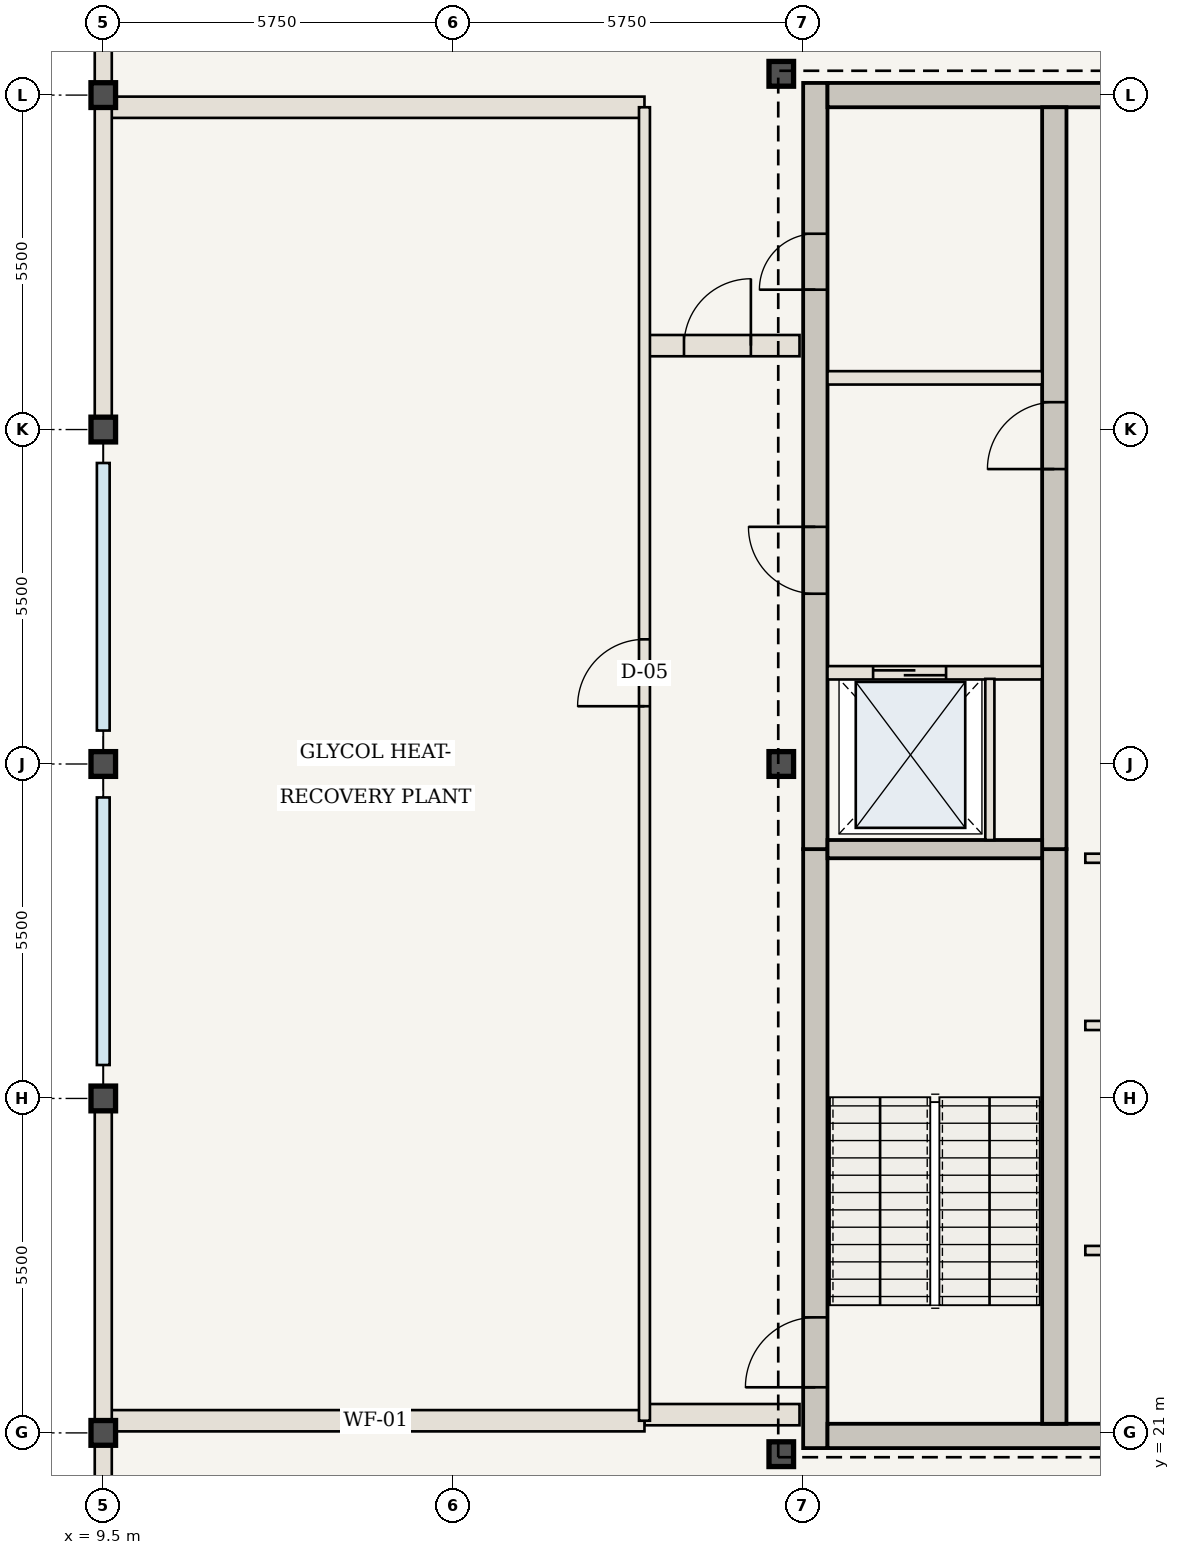
"""IFC4 building model, lengths in metres.
Left out: names, types, materials, properties, quantities, classifications, styles, units other than length and angle.
Written with IfcOpenShell. Run it as: python <this file> out.ifc"""

import sys

from ifc_helpers import new_model, si_unit, direction, frame, frame_2d, origin, origin_2d, place, context, subcontext, project, spatial, rectangle, i_section, extrude, element, fill, save


model = new_model("IFC4")
c1 = context("Model", 3, precision=1e-05, world=origin(), true_north=direction((0.0, 1.0)))
c2 = subcontext(c1, "Body", "Model", "MODEL_VIEW")
j1 = project(units=[si_unit("LENGTHUNIT", "METRE"), si_unit("PLANEANGLEUNIT", "RADIAN")], contexts=[c1])
p1 = place(None, origin())
s1 = spatial("IfcSite", under=j1, at=p1, CompositionType="ELEMENT")
p2 = place(p1, origin())
s2 = spatial("IfcBuilding", under=s1, at=p2, CompositionType="ELEMENT")
p3 = place(p2, frame((0.0, 0.0, 322.35)))
s3 = spatial("IfcBuildingStorey", under=s2, at=p3, CompositionType="ELEMENT", Elevation=322.35)
p4 = place(p3, frame((21.21, 20.75, 0.0), z_axis=(0.0, 0.0, 1.0), x_axis=(0.0, 1.0, 0.0)))
e1 = element("IfcWall", 1, at=p4, inside=s3, PredefinedType="SHEAR", context=c2, shape_type="SweptSolid", body=[
    extrude(rectangle(XDim=9.85, YDim=0.4, at=frame_2d((4.925, 0.0))), origin(), (0.0, 0.0, 1.0), 4.55),
])
p5 = place(p4, frame((1.0, 0.0, 0.0)))
e2 = element("IfcOpeningElement", 2, at=p5, cuts=e1, PredefinedType="OPENING", context=c2, shape_type="SweptSolid", body=[
    extrude(rectangle(XDim=1.15, YDim=2.15, at=frame_2d((0.575, 1.075))), frame((0.0, 0.21, 0.0), z_axis=(0.0, -1.0, 0.0), x_axis=(1.0, 0.0, 0.0)), (0.0, 0.0, 1.0), 0.42),
])
p6 = place(p3, frame((21.21, 30.6, 0.0), z_axis=(0.0, 0.0, 1.0), x_axis=(0.0, 1.0, 0.0)))
e3 = element("IfcWall", 3, at=p6, inside=s3, PredefinedType="SHEAR", context=c2, shape_type="SweptSolid", body=[
    extrude(rectangle(XDim=12.6, YDim=0.4, at=frame_2d((6.3, 0.0))), origin(), (0.0, 0.0, 1.0), 4.55),
])
p7 = place(p6, frame((4.2, 0.0, 0.0)))
e4 = element("IfcOpeningElement", 4, at=p7, cuts=e3, PredefinedType="OPENING", context=c2, shape_type="SweptSolid", body=[
    extrude(rectangle(XDim=1.1, YDim=2.15, at=frame_2d((0.55, 1.075))), frame((0.0, 0.21, 0.0), z_axis=(0.0, -1.0, 0.0), x_axis=(1.0, 0.0, 0.0)), (0.0, 0.0, 1.0), 0.42),
])
p8 = place(p6, frame((9.2, 0.0, 0.0)))
e5 = element("IfcOpeningElement", 5, at=p8, cuts=e3, PredefinedType="OPENING", context=c2, shape_type="SweptSolid", body=[
    extrude(rectangle(XDim=0.92, YDim=2.1, at=frame_2d((0.46, 1.05))), frame((0.0, 0.21, 0.0), z_axis=(0.0, -1.0, 0.0), x_axis=(1.0, 0.0, 0.0)), (0.0, 0.0, 1.0), 0.42),
])
p9 = place(p3, frame((21.41, 20.95, 0.0), z_axis=(0.0, 0.0, 1.0), x_axis=(1.0, 0.0, 0.0)))
e6 = element("IfcWall", 6, at=p9, inside=s3, PredefinedType="SHEAR", context=c2, shape_type="SweptSolid", body=[
    extrude(rectangle(XDim=13.74, YDim=0.4, at=frame_2d((6.87, 0.0))), origin(), (0.0, 0.0, 1.0), 4.55),
])
p10 = place(p3, frame((21.41, 43.0, 0.0), z_axis=(0.0, 0.0, 1.0), x_axis=(1.0, 0.0, 0.0)))
e7 = element("IfcWall", 7, at=p10, inside=s3, PredefinedType="SHEAR", context=c2, shape_type="SweptSolid", body=[
    extrude(rectangle(XDim=12.79, YDim=0.4, at=frame_2d((6.395, 0.0))), origin(), (0.0, 0.0, 1.0), 4.55),
])
p11 = place(p3, frame((25.14, 21.15, 0.0), z_axis=(0.0, 0.0, 1.0), x_axis=(0.0, 1.0, 0.0)))
e8 = element("IfcWall", 8, at=p11, inside=s3, PredefinedType="SHEAR", context=c2, shape_type="SweptSolid", body=[
    extrude(rectangle(XDim=9.45, YDim=0.4, at=frame_2d((4.725, 0.0))), origin(), (0.0, 0.0, 1.0), 4.55),
])
p12 = place(p3, frame((25.14, 30.6, 0.0), z_axis=(0.0, 0.0, 1.0), x_axis=(0.0, 1.0, 0.0)))
e9 = element("IfcWall", 9, at=p12, inside=s3, PredefinedType="SHEAR", context=c2, shape_type="SweptSolid", body=[
    extrude(rectangle(XDim=12.2, YDim=0.4, at=frame_2d((6.1, 0.0))), origin(), (0.0, 0.0, 1.0), 4.55),
])
p13 = place(p12, frame((6.25, 0.0, 0.0)))
e10 = element("IfcOpeningElement", 10, at=p13, cuts=e9, PredefinedType="OPENING", context=c2, shape_type="SweptSolid", body=[
    extrude(rectangle(XDim=1.1, YDim=2.15, at=frame_2d((0.55, 1.075))), frame((0.0, 0.21, 0.0), z_axis=(0.0, -1.0, 0.0), x_axis=(1.0, 0.0, 0.0)), (0.0, 0.0, 1.0), 0.42),
])
for number, where, z_axis, x_axis in (
    (11, (20.65, 20.65, 0.0), (0.0, 0.0, 1.0), (1.0, 0.0, 0.0)),
    (12, (20.65, 43.35, 0.0), (0.0, 0.0, 1.0), (1.0, 0.0, 0.0)),
    (13, (20.65, 32.0, 0.0), (0.0, 0.0, 1.0), (1.0, 0.0, 0.0)),
    (14, (9.5, 21.0, 0.0), (0.0, 0.0, 1.0), (1.0, 0.0, 0.0)),
    (15, (9.5, 26.5, 0.0), (0.0, 0.0, 1.0), (1.0, 0.0, 0.0)),
    (16, (9.5, 32.0, 0.0), (0.0, 0.0, 1.0), (1.0, 0.0, 0.0)),
    (17, (9.5, 37.5, 0.0), (0.0, 0.0, 1.0), (1.0, 0.0, 0.0)),
    (18, (9.5, 43.0, 0.0), (0.0, 0.0, 1.0), (1.0, 0.0, 0.0)),
):
    element("IfcColumn", number, at=place(p3, frame(where, z_axis=z_axis, x_axis=x_axis)), inside=s3, PredefinedType="COLUMN", context=c2, shape_type="SweptSolid", body=[
        extrude(i_section(OverallWidth=0.404, OverallDepth=0.407, WebThickness=0.027, FlangeThickness=0.044, at=origin_2d()), origin(), (0.0, 0.0, 1.0), 4.55),
    ])
p14 = place(p3, frame((21.41, 30.6, 0.0), z_axis=(0.0, 0.0, 1.0), x_axis=(1.0, 0.0, 0.0)))
e19 = element("IfcWall", 19, at=p14, inside=s3, PredefinedType="SHEAR", context=c2, shape_type="SweptSolid", body=[
    extrude(rectangle(XDim=3.53, YDim=0.3, at=frame_2d((1.765, 0.0))), origin(), (0.0, 0.0, 1.0), 4.29),
])
p15 = place(p3, frame((21.41, 33.5, 0.0), z_axis=(0.0, 0.0, 1.0), x_axis=(1.0, 0.0, 0.0)))
e20 = element("IfcWall", 20, at=p15, inside=s3, PredefinedType="STANDARD", context=c2, shape_type="SweptSolid", body=[
    extrude(rectangle(XDim=3.53, YDim=0.22, at=frame_2d((1.765, 0.0))), origin(), (0.0, 0.0, 1.0), 4.29),
])
p16 = place(p15, frame((0.75, 0.0, 0.0)))
e21 = element("IfcOpeningElement", 21, at=p16, cuts=e20, PredefinedType="OPENING", context=c2, shape_type="SweptSolid", body=[
    extrude(rectangle(XDim=1.2, YDim=2.2, at=frame_2d((0.6, 1.1))), frame((0.0, 0.12, 0.0), z_axis=(0.0, -1.0, 0.0), x_axis=(1.0, 0.0, 0.0)), (0.0, 0.0, 1.0), 0.24),
])
p17 = place(p3, frame((24.08, 30.75, 0.0), z_axis=(0.0, 0.0, 1.0), x_axis=(0.0, 1.0, 0.0)))
e22 = element("IfcWall", 22, at=p17, inside=s3, PredefinedType="STANDARD", context=c2, shape_type="SweptSolid", body=[
    extrude(rectangle(XDim=2.65, YDim=0.15, at=frame_2d((1.325, 0.0))), origin(), (0.0, 0.0, 1.0), 4.29),
])
p18 = place(p3, frame((21.41, 38.35, 0.0), z_axis=(0.0, 0.0, 1.0), x_axis=(1.0, 0.0, 0.0)))
e23 = element("IfcWall", 23, at=p18, inside=s3, PredefinedType="STANDARD", context=c2, shape_type="SweptSolid", body=[
    extrude(rectangle(XDim=3.53, YDim=0.22, at=frame_2d((1.765, 0.0))), origin(), (0.0, 0.0, 1.0), 4.29),
])
p19 = place(p3, frame((25.65, 24.0, 0.0), z_axis=(0.0, 0.0, 1.0), x_axis=(1.0, 0.0, 0.0)))
e24 = element("IfcWall", 24, at=p19, inside=s3, PredefinedType="STANDARD", context=c2, shape_type="SweptSolid", body=[
    extrude(rectangle(XDim=9.35, YDim=0.15, at=frame_2d((4.675, 0.0))), origin(), (0.0, 0.0, 1.0), 4.29),
])
p20 = place(p19, frame((1.35, 0.0, 0.0)))
e25 = element("IfcOpeningElement", 25, at=p20, cuts=e24, PredefinedType="OPENING", context=c2, shape_type="SweptSolid", body=[
    extrude(rectangle(XDim=0.95, YDim=2.15, at=frame_2d((0.475, 1.075))), frame((0.0, 0.085, 0.0), z_axis=(0.0, -1.0, 0.0), x_axis=(1.0, 0.0, 0.0)), (0.0, 0.0, 1.0), 0.17),
])
p21 = place(p19, frame((5.8, 0.0, 0.0)))
e26 = element("IfcOpeningElement", 26, at=p21, cuts=e24, PredefinedType="OPENING", context=c2, shape_type="SweptSolid", body=[
    extrude(rectangle(XDim=0.98, YDim=2.2, at=frame_2d((0.49, 1.1))), frame((0.0, 0.085, 0.0), z_axis=(0.0, -1.0, 0.0), x_axis=(1.0, 0.0, 0.0)), (0.0, 0.0, 1.0), 0.17),
])
p22 = place(p3, frame((25.65, 27.7, 0.0), z_axis=(0.0, 0.0, 1.0), x_axis=(1.0, 0.0, 0.0)))
e27 = element("IfcWall", 27, at=p22, inside=s3, PredefinedType="STANDARD", context=c2, shape_type="SweptSolid", body=[
    extrude(rectangle(XDim=9.35, YDim=0.15, at=frame_2d((4.675, 0.0))), origin(), (0.0, 0.0, 1.0), 4.29),
])
p23 = place(p22, frame((1.35, 0.0, 0.0)))
e28 = element("IfcOpeningElement", 28, at=p23, cuts=e27, PredefinedType="OPENING", context=c2, shape_type="SweptSolid", body=[
    extrude(rectangle(XDim=0.95, YDim=2.15, at=frame_2d((0.475, 1.075))), frame((0.0, 0.085, 0.0), z_axis=(0.0, -1.0, 0.0), x_axis=(1.0, 0.0, 0.0)), (0.0, 0.0, 1.0), 0.17),
])
p24 = place(p22, frame((6.4, 0.0, 0.0)))
e29 = element("IfcOpeningElement", 29, at=p24, cuts=e27, PredefinedType="OPENING", context=c2, shape_type="SweptSolid", body=[
    extrude(rectangle(XDim=0.98, YDim=2.2, at=frame_2d((0.49, 1.1))), frame((0.0, 0.085, 0.0), z_axis=(0.0, -1.0, 0.0), x_axis=(1.0, 0.0, 0.0)), (0.0, 0.0, 1.0), 0.17),
])
p25 = place(p3, frame((25.65, 30.45, 0.0), z_axis=(0.0, 0.0, 1.0), x_axis=(1.0, 0.0, 0.0)))
e30 = element("IfcWall", 30, at=p25, inside=s3, PredefinedType="STANDARD", context=c2, shape_type="SweptSolid", body=[
    extrude(rectangle(XDim=9.35, YDim=0.15, at=frame_2d((4.675, 0.0))), origin(), (0.0, 0.0, 1.0), 4.29),
])
p26 = place(p3, frame((18.4, 21.3, 0.0), z_axis=(0.0, 0.0, 1.0), x_axis=(1.0, 0.0, 0.0)))
e31 = element("IfcWall", 31, at=p26, inside=s3, PredefinedType="STANDARD", context=c2, shape_type="SweptSolid", body=[
    extrude(rectangle(XDim=2.55, YDim=0.35, at=frame_2d((1.275, 0.0))), origin(), (0.0, 0.0, 1.0), 4.29),
])
p27 = place(p3, frame((18.4, 38.88, 0.0), z_axis=(0.0, 0.0, 1.0), x_axis=(1.0, 0.0, 0.0)))
e32 = element("IfcWall", 32, at=p27, inside=s3, PredefinedType="STANDARD", context=c2, shape_type="SweptSolid", body=[
    extrude(rectangle(XDim=2.55, YDim=0.35, at=frame_2d((1.275, 0.0))), origin(), (0.0, 0.0, 1.0), 4.29),
])
p28 = place(p27, frame((0.65, 0.0, 0.0)))
e33 = element("IfcOpeningElement", 33, at=p28, cuts=e32, PredefinedType="OPENING", context=c2, shape_type="SweptSolid", body=[
    extrude(rectangle(XDim=1.1, YDim=2.15, at=frame_2d((0.55, 1.075))), frame((0.0, 0.185, 0.0), z_axis=(0.0, -1.0, 0.0), x_axis=(1.0, 0.0, 0.0)), (0.0, 0.0, 1.0), 0.37),
])
for number, where, z_axis, x_axis in (
    (34, (9.56, 21.2, 0.0), (0.0, 0.0, 1.0), (1.0, 0.0, 0.0)),
    (35, (9.56, 42.8, 0.0), (0.0, 0.0, 1.0), (1.0, 0.0, 0.0)),
):
    element("IfcWall", number, at=place(p3, frame(where, z_axis=z_axis, x_axis=x_axis)), inside=s3, PredefinedType="STANDARD", context=c2, shape_type="SweptSolid", body=[
        extrude(rectangle(XDim=8.84, YDim=0.35, at=frame_2d((4.42, 0.0))), origin(), (0.0, 0.0, 1.0), 4.29),
    ])
p29 = place(p3, frame((18.4, 21.2, 0.0), z_axis=(0.0, 0.0, 1.0), x_axis=(0.0, 1.0, 0.0)))
e36 = element("IfcWall", 36, at=p29, inside=s3, PredefinedType="STANDARD", context=c2, shape_type="SweptSolid", body=[
    extrude(rectangle(XDim=21.6, YDim=0.18, at=frame_2d((10.8, 0.0))), origin(), (0.0, 0.0, 1.0), 4.29),
])
p30 = place(p29, frame((11.75, 0.0, 0.0)))
e37 = element("IfcOpeningElement", 37, at=p30, cuts=e36, PredefinedType="OPENING", context=c2, shape_type="SweptSolid", body=[
    extrude(rectangle(XDim=1.1, YDim=2.15, at=frame_2d((0.55, 1.075))), frame((0.0, 0.1, 0.0), z_axis=(0.0, -1.0, 0.0), x_axis=(1.0, 0.0, 0.0)), (0.0, 0.0, 1.0), 0.2),
])
for number, where, z_axis, x_axis in (
    (38, (9.5, 15.5, 0.0), (0.0, 0.0, 1.0), (0.0, 1.0, 0.0)),
    (39, (9.5, 21.0, 0.0), (0.0, 0.0, 1.0), (0.0, 1.0, 0.0)),
    (40, (9.5, 37.5, 0.0), (0.0, 0.0, 1.0), (0.0, 1.0, 0.0)),
    (41, (9.5, 43.0, 0.0), (0.0, 0.0, 1.0), (0.0, 1.0, 0.0)),
):
    element("IfcWall", number, at=place(p3, frame(where, z_axis=z_axis, x_axis=x_axis)), inside=s3, PredefinedType="USERDEFINED", context=c2, shape_type="SweptSolid", body=[
        extrude(rectangle(XDim=5.5, YDim=0.28, at=frame_2d((2.75, 0.0))), origin(), (0.0, 0.0, 1.0), 3.57),
    ])
p31 = place(p5, origin())
e42 = element("IfcDoor", 42, at=p31, inside=s3, OperationType="SINGLE_SWING_LEFT", PredefinedType="DOOR", context=c2, shape_type="SweptSolid", body=[
    extrude(rectangle(XDim=1.15, YDim=2.15, at=frame_2d((0.575, 1.075))), frame((0.0, 0.025, 0.0), z_axis=(0.0, -1.0, 0.0), x_axis=(1.0, 0.0, 0.0)), (0.0, 0.0, 1.0), 0.05),
])
fill(e2, e42)
p32 = place(p7, origin())
e43 = element("IfcDoor", 43, at=p32, inside=s3, OperationType="SINGLE_SWING_RIGHT", PredefinedType="DOOR", context=c2, shape_type="SweptSolid", body=[
    extrude(rectangle(XDim=1.1, YDim=2.15, at=frame_2d((0.55, 1.075))), frame((0.0, 0.025, 0.0), z_axis=(0.0, -1.0, 0.0), x_axis=(1.0, 0.0, 0.0)), (0.0, 0.0, 1.0), 0.05),
])
fill(e4, e43)
p33 = place(p13, origin())
e44 = element("IfcDoor", 44, at=p33, inside=s3, OperationType="SINGLE_SWING_LEFT", PredefinedType="DOOR", context=c2, shape_type="SweptSolid", body=[
    extrude(rectangle(XDim=1.1, YDim=2.15, at=frame_2d((0.55, 1.075))), frame((0.0, 0.025, 0.0), z_axis=(0.0, -1.0, 0.0), x_axis=(1.0, 0.0, 0.0)), (0.0, 0.0, 1.0), 0.05),
])
fill(e10, e44)
p34 = place(p8, origin())
e45 = element("IfcDoor", 45, at=p34, inside=s3, OperationType="SINGLE_SWING_LEFT", PredefinedType="DOOR", context=c2, shape_type="SweptSolid", body=[
    extrude(rectangle(XDim=0.92, YDim=2.1, at=frame_2d((0.46, 1.05))), frame((0.0, 0.025, 0.0), z_axis=(0.0, -1.0, 0.0), x_axis=(1.0, 0.0, 0.0)), (0.0, 0.0, 1.0), 0.05),
])
fill(e5, e45)
p35 = place(p16, origin())
e46 = element("IfcDoor", 46, at=p35, inside=s3, OperationType="DOUBLE_DOOR_SLIDING", PredefinedType="DOOR", context=c2, shape_type="SweptSolid", body=[
    extrude(rectangle(XDim=1.2, YDim=2.2, at=frame_2d((0.6, 1.1))), frame((0.0, 0.025, 0.0), z_axis=(0.0, -1.0, 0.0), x_axis=(1.0, 0.0, 0.0)), (0.0, 0.0, 1.0), 0.05),
])
fill(e21, e46)
p36 = place(p28, origin())
e47 = element("IfcDoor", 47, at=p36, inside=s3, OperationType="SINGLE_SWING_RIGHT", PredefinedType="DOOR", context=c2, shape_type="SweptSolid", body=[
    extrude(rectangle(XDim=1.1, YDim=2.15, at=frame_2d((0.55, 1.075))), frame((0.0, 0.025, 0.0), z_axis=(0.0, -1.0, 0.0), x_axis=(1.0, 0.0, 0.0)), (0.0, 0.0, 1.0), 0.05),
])
fill(e33, e47)
p37 = place(p30, origin())
e48 = element("IfcDoor", 48, at=p37, inside=s3, OperationType="SINGLE_SWING_LEFT", PredefinedType="DOOR", context=c2, shape_type="SweptSolid", body=[
    extrude(rectangle(XDim=1.1, YDim=2.15, at=frame_2d((0.55, 1.075))), frame((0.0, 0.025, 0.0), z_axis=(0.0, -1.0, 0.0), x_axis=(1.0, 0.0, 0.0)), (0.0, 0.0, 1.0), 0.05),
])
fill(e37, e48)
save(model, sys.argv[1])
